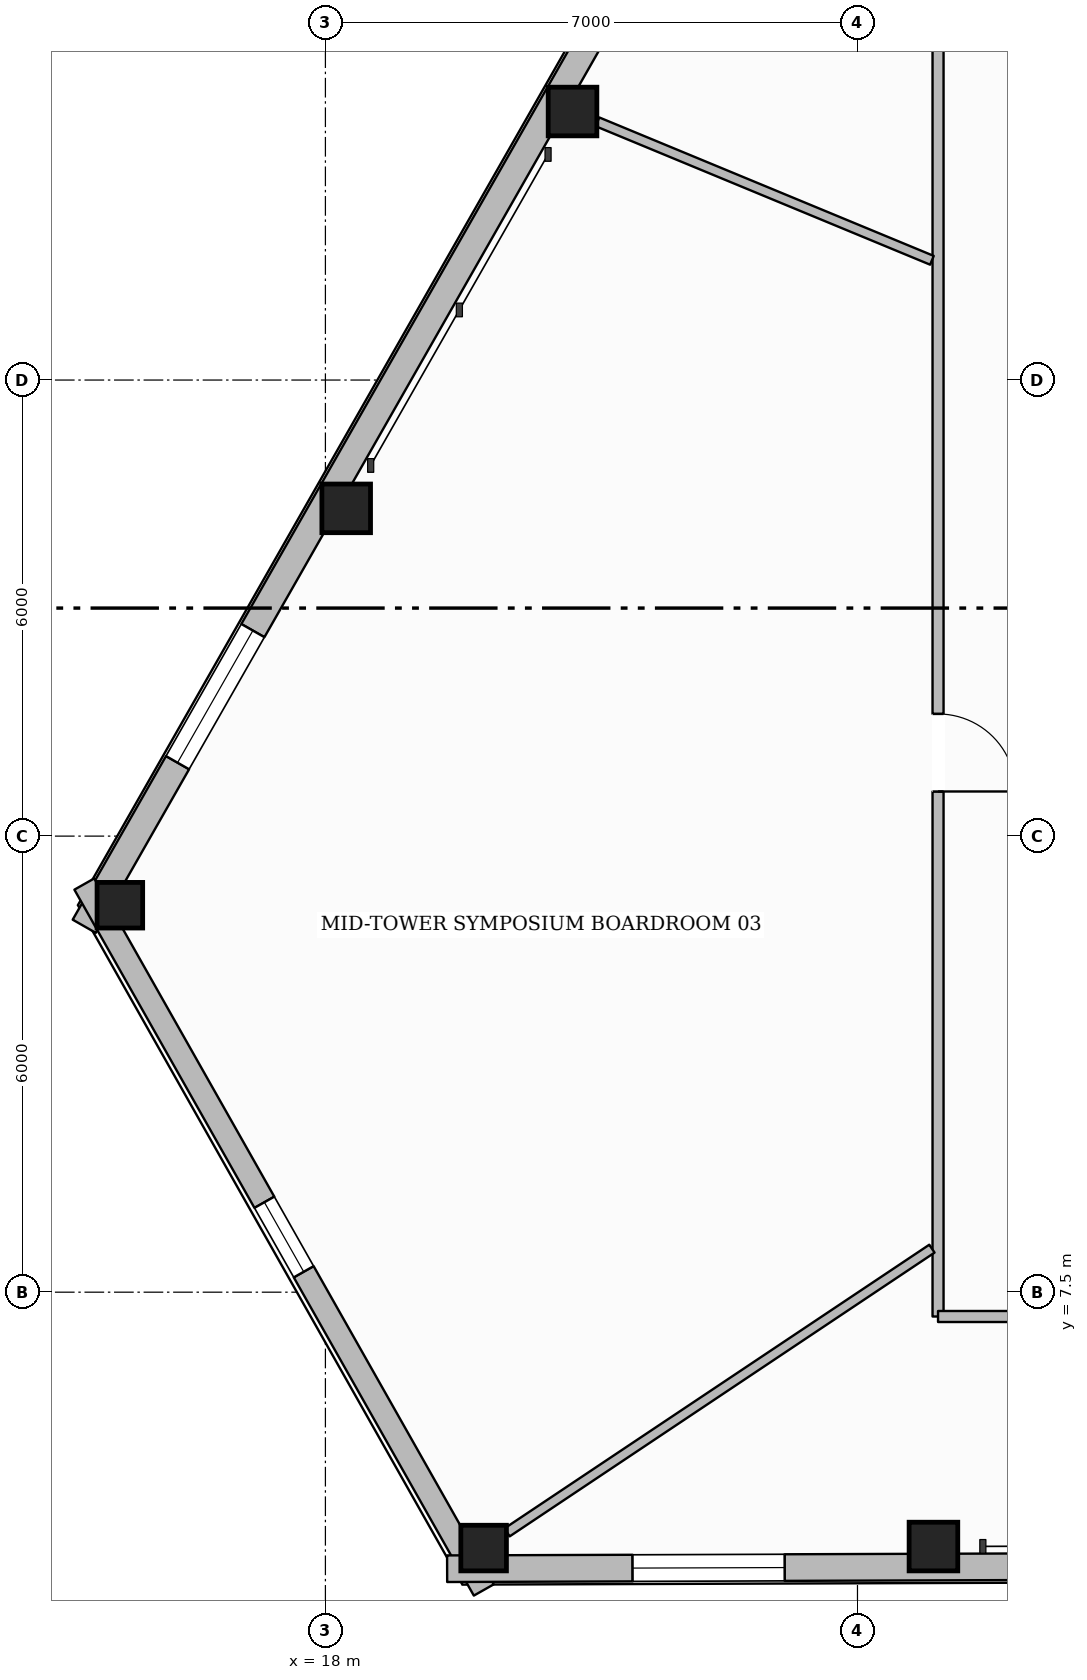
"""IFC4 building model, lengths in metres.
Left out: names, types, materials, properties, quantities, classifications, styles, units other than length and angle.
Written with IfcOpenShell. Run it as: python <this file> out.ifc"""

import sys

from ifc_helpers import new_model, si_unit, direction, frame, frame_2d, origin, origin_2d, place, context, subcontext, project, spatial, rectangle, hollow_rectangle, extrude, element, fill, save


model = new_model("IFC4")
c1 = context("Model", 3, precision=1e-05, world=origin(), true_north=direction((0.0, 1.0)))
c2 = subcontext(c1, "Body", "Model", "MODEL_VIEW")
j1 = project(units=[si_unit("LENGTHUNIT", "METRE"), si_unit("PLANEANGLEUNIT", "RADIAN")], contexts=[c1])
p1 = place(None, origin())
s1 = spatial("IfcSite", under=j1, at=p1, CompositionType="ELEMENT")
p2 = place(p1, origin())
s2 = spatial("IfcBuilding", under=s1, at=p2, CompositionType="ELEMENT")
p3 = place(p2, frame((0.0, 0.0, 160.0)))
s3 = spatial("IfcBuildingStorey", under=s2, at=p3, CompositionType="ELEMENT", Elevation=160.0)
for number, where, z_axis, x_axis in (
    (1, (21.251, 23.033, 0.0), (0.0, 0.0, 1.0), (1.0, 0.0, 0.0)),
    (2, (18.273, 17.812, 0.0), (0.0, 0.0, 1.0), (1.0, 0.0, 0.0)),
):
    element("IfcColumn", number, at=place(p3, frame(where, z_axis=z_axis, x_axis=x_axis)), inside=s3, PredefinedType="COLUMN", context=c2, shape_type="SweptSolid", body=[
        extrude(hollow_rectangle(XDim=0.64, YDim=0.64, WallThickness=0.028, at=origin_2d()), origin(), (0.0, 0.0, 1.0), 4.75),
    ])
for number, where, z_axis, x_axis in (
    (3, (15.296, 12.591, 0.0), (0.0, 0.0, 1.0), (1.0, 0.0, 0.0)),
    (4, (20.082, 4.134, 0.0), (0.0, 0.0, 1.0), (1.0, 0.0, 0.0)),
):
    element("IfcColumn", number, at=place(p3, frame(where, z_axis=z_axis, x_axis=x_axis)), inside=s3, PredefinedType="COLUMN", context=c2, shape_type="SweptSolid", body=[
        extrude(hollow_rectangle(XDim=0.6, YDim=0.6, WallThickness=0.028, at=origin_2d()), origin(), (0.0, 0.0, 1.0), 4.75),
    ])
p4 = place(p3, frame((26.0, 4.154, 0.0), z_axis=(0.0, 0.0, 1.0), x_axis=(1.0, 0.0, 0.0)))
e5 = element("IfcColumn", 5, at=p4, inside=s3, PredefinedType="COLUMN", context=c2, shape_type="SweptSolid", body=[
    extrude(hollow_rectangle(XDim=0.64, YDim=0.64, WallThickness=0.028, at=origin_2d()), origin(), (0.0, 0.0, 1.0), 4.75),
])
p5 = place(p3, frame((14.827, 12.314, 0.0), z_axis=(0.0, 0.0, 1.0), x_axis=(0.495417756307, 0.868654849026, 0.0)))
e6 = element("IfcWall", 6, at=p5, inside=s3, PredefinedType="STANDARD", context=c2, shape_type="SweptSolid", body=[
    extrude(rectangle(XDim=37.012, YDim=0.35, at=frame_2d((18.506, 0.0))), origin(), (0.0, 0.0, 1.0), 4.282),
])
p6 = place(p5, frame((32.53, 0.0, 0.65)))
e7 = element("IfcOpeningElement", 7, at=p6, cuts=e6, PredefinedType="OPENING", context=c2, shape_type="SweptSolid", body=[
    extrude(rectangle(XDim=2.0, YDim=2.25, at=frame_2d((1.0, 1.125))), frame((0.0, 0.185, 0.0), z_axis=(0.0, -1.0, 0.0), x_axis=(1.0, 0.0, 0.0)), (0.0, 0.0, 1.0), 0.37),
])
p7 = place(p5, frame((2.478, 0.0, 0.65)))
e8 = element("IfcOpeningElement", 8, at=p7, cuts=e6, PredefinedType="OPENING", context=c2, shape_type="SweptSolid", body=[
    extrude(rectangle(XDim=2.0, YDim=2.25, at=frame_2d((1.0, 1.125))), frame((0.0, 0.185, 0.0), z_axis=(0.0, -1.0, 0.0), x_axis=(1.0, 0.0, 0.0)), (0.0, 0.0, 1.0), 0.37),
])
p8 = place(p3, frame((20.083, 3.582, 0.0), z_axis=(0.0, 0.0, 1.0), x_axis=(-0.492483138228, 0.870321985567, 0.0)))
e9 = element("IfcWall", 9, at=p8, inside=s3, PredefinedType="STANDARD", context=c2, shape_type="SweptSolid", body=[
    extrude(rectangle(XDim=10.671, YDim=0.3, at=frame_2d((5.335, 0.0))), origin(), (0.0, 0.0, 1.0), 4.282),
])
p9 = place(p8, frame((4.811, 0.0, 0.65)))
e10 = element("IfcOpeningElement", 10, at=p9, cuts=e9, PredefinedType="OPENING", context=c2, shape_type="SweptSolid", body=[
    extrude(rectangle(XDim=1.05, YDim=1.7, at=frame_2d((0.525, 0.85))), frame((0.0, 0.16, 0.0), z_axis=(0.0, -1.0, 0.0), x_axis=(1.0, 0.0, 0.0)), (0.0, 0.0, 1.0), 0.32),
])
p10 = place(p3, frame((56.067, 3.985, 0.0), z_axis=(0.0, 0.0, 1.0), x_axis=(-0.999994307151, -0.003374265262, 0.0)))
e11 = element("IfcWall", 11, at=p10, inside=s3, PredefinedType="STANDARD", context=c2, shape_type="SweptSolid", body=[
    extrude(rectangle(XDim=36.466, YDim=0.35, at=frame_2d((18.233, 0.0))), origin(), (0.0, 0.0, 1.0), 4.282),
])
p11 = place(p10, frame((32.026, 0.0, 0.65)))
e12 = element("IfcOpeningElement", 12, at=p11, cuts=e11, PredefinedType="OPENING", context=c2, shape_type="SweptSolid", body=[
    extrude(rectangle(XDim=2.0, YDim=2.25, at=frame_2d((1.0, 1.125))), frame((0.0, 0.185, 0.0), z_axis=(0.0, -1.0, 0.0), x_axis=(1.0, 0.0, 0.0)), (0.0, 0.0, 1.0), 0.37),
])
p12 = place(p10, frame((2.437, 0.0, 0.65)))
e13 = element("IfcOpeningElement", 13, at=p12, cuts=e11, PredefinedType="OPENING", context=c2, shape_type="SweptSolid", body=[
    extrude(rectangle(XDim=2.0, YDim=2.25, at=frame_2d((1.0, 1.125))), frame((0.0, 0.185, 0.0), z_axis=(0.0, -1.0, 0.0), x_axis=(1.0, 0.0, 0.0)), (0.0, 0.0, 1.0), 0.37),
])
p13 = place(p3, frame((26.06, 25.02, 0.0), z_axis=(0.0, 0.0, 1.0), x_axis=(0.0, -1.0, 0.0)))
e14 = element("IfcWall", 14, at=p13, inside=s3, PredefinedType="PARTITIONING", context=c2, shape_type="SweptSolid", body=[
    extrude(rectangle(XDim=17.84, YDim=0.145, at=frame_2d((8.92, 0.0))), origin(), (0.0, 0.0, 1.0), 4.489),
])
p14 = place(p13, frame((9.913, 0.0, 0.0)))
e15 = element("IfcOpeningElement", 15, at=p14, cuts=e14, PredefinedType="OPENING", context=c2, shape_type="SweptSolid", body=[
    extrude(rectangle(XDim=1.02, YDim=2.15, at=frame_2d((0.51, 1.075))), frame((0.0, 0.083, 0.0), z_axis=(0.0, -1.0, 0.0), x_axis=(1.0, 0.0, 0.0)), (0.0, 0.0, 1.0), 0.165),
])
p15 = place(p3, frame((26.06, 7.18, 0.0), z_axis=(0.0, 0.0, 1.0), x_axis=(1.0, 0.0, 0.0)))
e16 = element("IfcWall", 16, at=p15, inside=s3, PredefinedType="PARTITIONING", context=c2, shape_type="SweptSolid", body=[
    extrude(rectangle(XDim=23.88, YDim=0.145, at=frame_2d((11.94, 0.0))), origin(), (0.0, 0.0, 1.0), 4.75),
])
p16 = place(p15, frame((4.5, 0.0, 0.0)))
e17 = element("IfcOpeningElement", 17, at=p16, cuts=e16, PredefinedType="OPENING", context=c2, shape_type="SweptSolid", body=[
    extrude(rectangle(XDim=0.88, YDim=2.1, at=frame_2d((0.44, 1.05))), frame((0.0, 0.083, 0.0), z_axis=(0.0, -1.0, 0.0), x_axis=(1.0, 0.0, 0.0)), (0.0, 0.0, 1.0), 0.165),
])
p17 = place(p15, frame((7.02, 0.0, 0.0)))
e18 = element("IfcOpeningElement", 18, at=p17, cuts=e16, PredefinedType="OPENING", context=c2, shape_type="SweptSolid", body=[
    extrude(rectangle(XDim=0.88, YDim=2.1, at=frame_2d((0.44, 1.05))), frame((0.0, 0.083, 0.0), z_axis=(0.0, -1.0, 0.0), x_axis=(1.0, 0.0, 0.0)), (0.0, 0.0, 1.0), 0.165),
])
p18 = place(p15, frame((9.4, 0.0, 0.0)))
e19 = element("IfcOpeningElement", 19, at=p18, cuts=e16, PredefinedType="OPENING", context=c2, shape_type="SweptSolid", body=[
    extrude(rectangle(XDim=0.96, YDim=2.1, at=frame_2d((0.48, 1.05))), frame((0.0, 0.083, 0.0), z_axis=(0.0, -1.0, 0.0), x_axis=(1.0, 0.0, 0.0)), (0.0, 0.0, 1.0), 0.165),
])
p19 = place(p15, frame((1.421, 0.0, 0.0)))
e20 = element("IfcOpeningElement", 20, at=p19, cuts=e16, PredefinedType="OPENING", context=c2, shape_type="SweptSolid", body=[
    extrude(rectangle(XDim=1.02, YDim=2.15, at=frame_2d((0.51, 1.075))), frame((0.0, 0.083, 0.0), z_axis=(0.0, -1.0, 0.0), x_axis=(1.0, 0.0, 0.0)), (0.0, 0.0, 1.0), 0.165),
])
p20 = place(p15, frame((16.859, 0.0, 0.0)))
e21 = element("IfcOpeningElement", 21, at=p20, cuts=e16, PredefinedType="OPENING", context=c2, shape_type="SweptSolid", body=[
    extrude(rectangle(XDim=1.02, YDim=2.15, at=frame_2d((0.51, 1.075))), frame((0.0, 0.083, 0.0), z_axis=(0.0, -1.0, 0.0), x_axis=(1.0, 0.0, 0.0)), (0.0, 0.0, 1.0), 0.165),
])
p21 = place(p3, frame((25.979, 21.075, 0.0), z_axis=(0.0, 0.0, 1.0), x_axis=(-0.923966237797, 0.38247404018, 0.0)))
e22 = element("IfcWall", 22, at=p21, inside=s3, PredefinedType="PARTITIONING", context=c2, shape_type="SweptSolid", body=[
    extrude(rectangle(XDim=4.762, YDim=0.125, at=frame_2d((2.381, 0.0))), origin(), (0.0, 0.0, 1.0), 4.75),
])
p22 = place(p3, frame((25.979, 8.073, 0.0), z_axis=(0.0, 0.0, 1.0), x_axis=(-0.831608608725, -0.55536215382, 0.0)))
e23 = element("IfcWall", 23, at=p22, inside=s3, PredefinedType="PARTITIONING", context=c2, shape_type="SweptSolid", body=[
    extrude(rectangle(XDim=6.722, YDim=0.125, at=frame_2d((3.361, 0.0))), origin(), (0.0, 0.0, 1.0), 4.291),
])
p23 = place(p7, origin())
e24 = element("IfcWindow", 24, at=p23, inside=s3, PartitioningType="SINGLE_PANEL", PredefinedType="WINDOW", context=c2, shape_type="SweptSolid", body=[
    extrude(rectangle(XDim=2.0, YDim=2.25, at=frame_2d((1.0, 1.125))), frame((0.0, 0.03, 0.0), z_axis=(0.0, -1.0, 0.0), x_axis=(1.0, 0.0, 0.0)), (0.0, 0.0, 1.0), 0.06),
])
fill(e8, e24)
p24 = place(p11, origin())
e25 = element("IfcWindow", 25, at=p24, inside=s3, PartitioningType="SINGLE_PANEL", PredefinedType="WINDOW", context=c2, shape_type="SweptSolid", body=[
    extrude(rectangle(XDim=2.0, YDim=2.25, at=frame_2d((1.0, 1.125))), frame((0.0, 0.03, 0.0), z_axis=(0.0, -1.0, 0.0), x_axis=(1.0, 0.0, 0.0)), (0.0, 0.0, 1.0), 0.06),
])
fill(e12, e25)
p25 = place(p9, origin())
e26 = element("IfcWindow", 26, at=p25, inside=s3, PartitioningType="SINGLE_PANEL", PredefinedType="WINDOW", context=c2, shape_type="SweptSolid", body=[
    extrude(rectangle(XDim=1.05, YDim=1.7, at=frame_2d((0.525, 0.85))), frame((0.0, 0.03, 0.0), z_axis=(0.0, -1.0, 0.0), x_axis=(1.0, 0.0, 0.0)), (0.0, 0.0, 1.0), 0.06),
])
fill(e10, e26)
p26 = place(p14, origin())
e27 = element("IfcDoor", 27, at=p26, inside=s3, OperationType="SINGLE_SWING_RIGHT", PredefinedType="DOOR", context=c2, shape_type="SweptSolid", body=[
    extrude(rectangle(XDim=1.02, YDim=2.15, at=frame_2d((0.51, 1.075))), frame((0.0, 0.025, 0.0), z_axis=(0.0, -1.0, 0.0), x_axis=(1.0, 0.0, 0.0)), (0.0, 0.0, 1.0), 0.05),
])
fill(e15, e27)
save(model, sys.argv[1])
